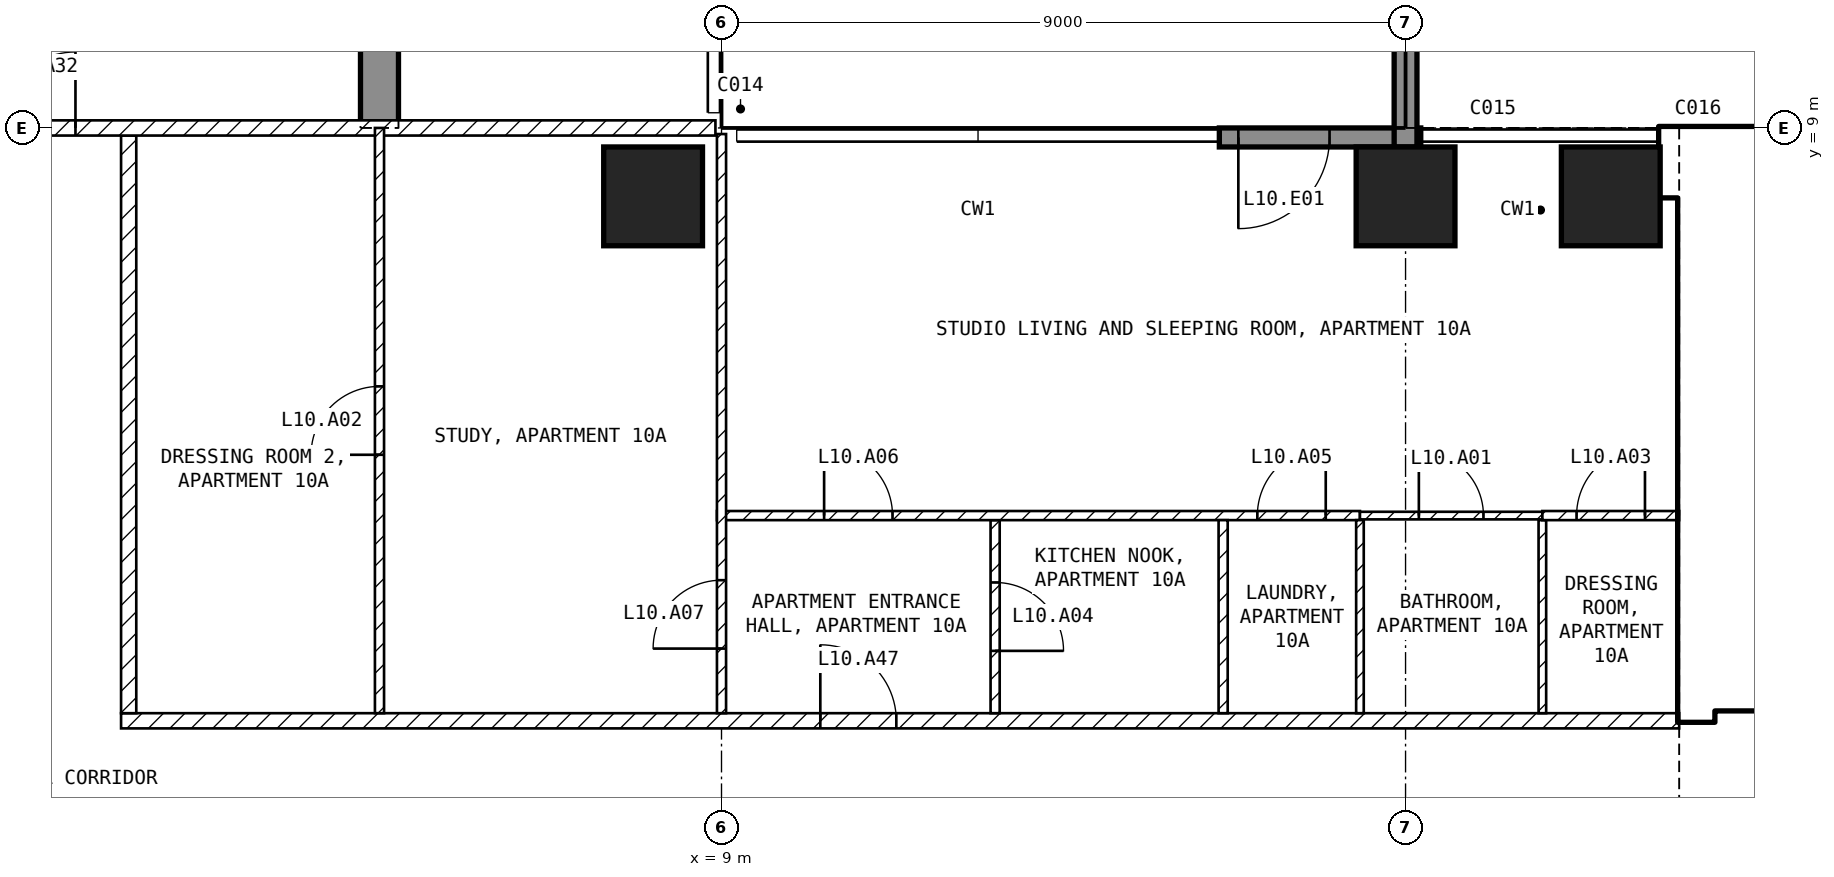
"""IFC4 building model, lengths in metres.
Left out: names, types, materials, properties, quantities, classifications, styles, units other than length and angle.
Written with IfcOpenShell. Run it as: python <this file> out.ifc"""

import sys

from ifc_helpers import new_model, si_unit, direction, frame, frame_2d, origin, origin_2d, place, context, subcontext, project, spatial, polyline, rectangle, outline, extrude, element, fill, save


model = new_model("IFC4")
c1 = context("Model", 3, precision=1e-05, world=origin(), true_north=direction((0.0, 1.0)))
c2 = subcontext(c1, "Body", "Model", "MODEL_VIEW")
j1 = project(units=[si_unit("LENGTHUNIT", "METRE"), si_unit("PLANEANGLEUNIT", "RADIAN")], contexts=[c1])
p1 = place(None, origin())
s1 = spatial("IfcSite", under=j1, at=p1, CompositionType="ELEMENT")
p2 = place(p1, origin())
s2 = spatial("IfcBuilding", under=s1, at=p2, CompositionType="ELEMENT")
p3 = place(p2, frame((0.0, 0.0, 54.0)))
s3 = spatial("IfcBuildingStorey", under=s2, at=p3, CompositionType="ELEMENT", Elevation=54.0)
for number, where, z_axis, x_axis in (
    (1, (8.1, 8.1, -0.25), (0.0, 0.0, 1.0), (1.0, 0.0, 0.0)),
    (2, (18.0, 8.1, -0.25), (0.0, 0.0, 1.0), (1.0, 0.0, 0.0)),
    (3, (20.7, 8.1, -0.25), (0.0, 0.0, 1.0), (1.0, 0.0, 0.0)),
):
    element("IfcColumn", number, at=place(p3, frame(where, z_axis=z_axis, x_axis=x_axis)), inside=s3, PredefinedType="COLUMN", context=c2, shape_type="SweptSolid", body=[
        extrude(rectangle(XDim=1.3, YDim=1.3, at=origin_2d()), origin(), (0.0, 0.0, 1.0), 3.5),
    ])
p4 = place(p3, frame((4.25, 9.0, -0.25), z_axis=(1.0, 0.0, 0.0), x_axis=(0.0, 1.0, 0.0)))
e4 = element("IfcWall", 4, at=p4, inside=s3, PredefinedType="SHEAR", context=c2, shape_type="SweptSolid", body=[
    extrude(outline(polyline([(0.0, 0.0), (2.1, 0.0), (2.1, 2.65), (4.5, 2.65), (4.5, 0.0), (9.9, 0.0), (9.9, 2.65), (12.3, 2.65), (12.3, 0.0), (16.45, 0.0), (16.45, 3.5), (0.0, 3.5), (0.0, 0.0)])), origin(), (0.0, 0.0, 1.0), 0.5),
])
p5 = place(p3, frame((18.2, 8.875, 0.0), z_axis=(0.0, 0.0, 1.0), x_axis=(-1.0, 0.0, 0.0)))
e5 = element("IfcWall", 5, at=p5, inside=s3, PredefinedType="SOLIDWALL", context=c2, shape_type="SweptSolid", body=[
    extrude(rectangle(XDim=2.65, YDim=0.25, at=frame_2d((1.325, 0.0))), origin(), (0.0, 0.0, 1.0), 3.25),
])
p6 = place(p5, frame((1.2, 0.0, 0.0)))
e6 = element("IfcOpeningElement", 6, at=p6, cuts=e5, PredefinedType="OPENING", context=c2, shape_type="SweptSolid", body=[
    extrude(rectangle(XDim=1.2, YDim=2.4, at=frame_2d((0.6, 1.2))), frame((0.0, 0.135, 0.0), z_axis=(0.0, -1.0, 0.0), x_axis=(1.0, 0.0, 0.0)), (0.0, 0.0, 1.0), 0.27),
])
p7 = place(p3, frame((18.0, 8.75, 0.0), z_axis=(0.0, 0.0, 1.0), x_axis=(0.0, 1.0, 0.0)))
e7 = element("IfcWall", 7, at=p7, inside=s3, PredefinedType="SOLIDWALL", context=c2, shape_type="SweptSolid", body=[
    extrude(rectangle(XDim=2.95, YDim=0.3, at=frame_2d((1.475, 0.0))), origin(), (0.0, 0.0, 1.0), 3.25),
])
p8 = place(p3, frame((21.35, 8.55, 0.0), z_axis=(0.0, 0.0, 1.0), x_axis=(1.0, 0.0, 0.0)))
e8 = element("IfcWall", 8, at=p8, inside=s3, PredefinedType="SHEAR", context=c2, shape_type="SweptSolid", body=[
    extrude(rectangle(XDim=10.15, YDim=0.9, at=frame_2d((5.075, 0.0))), origin(), (0.0, 0.0, 1.0), 3.25),
])
p9 = place(p3, frame((21.825, 1.2, 0.0), z_axis=(0.0, 0.0, 1.0), x_axis=(0.0, 1.0, 0.0)))
e9 = element("IfcWall", 9, at=p9, inside=s3, PredefinedType="SHEAR", context=c2, shape_type="SweptSolid", body=[
    extrude(rectangle(XDim=6.9, YDim=0.45, at=frame_2d((3.45, 0.0))), origin(), (0.0, 0.0, 1.0), 3.25),
])
p10 = place(p3, frame((22.05, 1.45, 0.0), z_axis=(0.0, 0.0, 1.0), x_axis=(1.0, 0.0, 0.0)))
e10 = element("IfcWall", 10, at=p10, inside=s3, PredefinedType="SOLIDWALL", context=c2, shape_type="SweptSolid", body=[
    extrude(rectangle(XDim=13.05, YDim=0.2, at=frame_2d((6.525, 0.0))), origin(), (0.0, 0.0, 1.0), 3.25),
])
p11 = place(p10, frame((0.75, 0.0, 0.0)))
e11 = element("IfcOpeningElement", 11, at=p11, cuts=e10, PredefinedType="OPENING", context=c2, shape_type="SweptSolid", body=[
    extrude(rectangle(XDim=1.0, YDim=2.1, at=frame_2d((0.5, 1.05))), frame((0.0, 0.11, 0.0), z_axis=(0.0, -1.0, 0.0), x_axis=(1.0, 0.0, 0.0)), (0.0, 0.0, 1.0), 0.22),
])
p12 = place(p10, frame((3.25, 0.0, 0.0)))
e12 = element("IfcOpeningElement", 12, at=p12, cuts=e10, PredefinedType="OPENING", context=c2, shape_type="SweptSolid", body=[
    extrude(rectangle(XDim=1.0, YDim=2.1, at=frame_2d((0.5, 1.05))), frame((0.0, 0.11, 0.0), z_axis=(0.0, -1.0, 0.0), x_axis=(1.0, 0.0, 0.0)), (0.0, 0.0, 1.0), 0.22),
])
p13 = place(p3, frame((22.05, 5.15, 0.0), z_axis=(0.0, 0.0, 1.0), x_axis=(1.0, 0.0, 0.0)))
e13 = element("IfcWall", 13, at=p13, inside=s3, PredefinedType="SOLIDWALL", context=c2, shape_type="SweptSolid", body=[
    extrude(rectangle(XDim=6.3, YDim=0.2, at=frame_2d((3.15, 0.0))), origin(), (0.0, 0.0, 1.0), 3.25),
])
p14 = place(p13, frame((0.2, 0.0, 0.0)))
e14 = element("IfcOpeningElement", 14, at=p14, cuts=e13, PredefinedType="OPENING", context=c2, shape_type="SweptSolid", body=[
    extrude(rectangle(XDim=1.0, YDim=2.1, at=frame_2d((0.5, 1.05))), frame((0.0, 0.11, 0.0), z_axis=(0.0, -1.0, 0.0), x_axis=(1.0, 0.0, 0.0)), (0.0, 0.0, 1.0), 0.22),
])
p15 = place(p3, frame((1.1, 1.2, 0.0), z_axis=(0.0, 0.0, 1.0), x_axis=(1.0, 0.0, 0.0)))
e15 = element("IfcWall", 15, at=p15, inside=s3, PredefinedType="PARTITIONING", context=c2, shape_type="SweptSolid", body=[
    extrude(rectangle(XDim=20.5, YDim=0.2, at=frame_2d((10.25, 0.0))), origin(), (0.0, 0.0, 1.0), 3.25),
])
p16 = place(p15, frame((9.2, 0.0, 0.0)))
e16 = element("IfcOpeningElement", 16, at=p16, cuts=e15, PredefinedType="OPENING", context=c2, shape_type="SweptSolid", body=[
    extrude(rectangle(XDim=1.0, YDim=2.1, at=frame_2d((0.5, 1.05))), frame((0.0, 0.11, 0.0), z_axis=(0.0, -1.0, 0.0), x_axis=(1.0, 0.0, 0.0)), (0.0, 0.0, 1.0), 0.22),
])
p17 = place(p3, frame((1.2, 8.9, 0.0), z_axis=(0.0, 0.0, 1.0), x_axis=(0.0, -1.0, 0.0)))
e17 = element("IfcWall", 17, at=p17, inside=s3, PredefinedType="PARTITIONING", context=c2, shape_type="SweptSolid", body=[
    extrude(rectangle(XDim=7.6, YDim=0.2, at=frame_2d((3.8, 0.0))), origin(), (0.0, 0.0, 1.0), 3.25),
])
p18 = place(p3, frame((-8.92, 9.0, 0.0), z_axis=(0.0, 0.0, 1.0), x_axis=(1.0, 0.0, 0.0)))
e18 = element("IfcWall", 18, at=p18, inside=s3, PredefinedType="PARTITIONING", context=c2, shape_type="SweptSolid", body=[
    extrude(rectangle(XDim=17.84, YDim=0.2, at=frame_2d((8.92, 0.0))), origin(), (0.0, 0.0, 1.0), 3.25),
])
p19 = place(p18, frame((8.42, 0.0, 0.0)))
e19 = element("IfcOpeningElement", 19, at=p19, cuts=e18, PredefinedType="OPENING", context=c2, shape_type="SweptSolid", body=[
    extrude(rectangle(XDim=1.0, YDim=2.1, at=frame_2d((0.5, 1.05))), frame((0.0, 0.11, 0.0), z_axis=(0.0, -1.0, 0.0), x_axis=(1.0, 0.0, 0.0)), (0.0, 0.0, 1.0), 0.22),
])
p20 = place(p3, frame((12.6, 3.84, 0.0), z_axis=(0.0, 0.0, 1.0), x_axis=(0.0, -1.0, 0.0)))
e20 = element("IfcWall", 20, at=p20, inside=s3, PredefinedType="PARTITIONING", context=c2, shape_type="SweptSolid", body=[
    extrude(rectangle(XDim=2.54, YDim=0.12, at=frame_2d((1.27, 0.0))), origin(), (0.0, 0.0, 1.0), 3.25),
])
p21 = place(p20, frame((0.82, 0.0, 0.0)))
e21 = element("IfcOpeningElement", 21, at=p21, cuts=e20, PredefinedType="OPENING", context=c2, shape_type="SweptSolid", body=[
    extrude(rectangle(XDim=0.9, YDim=2.1, at=frame_2d((0.45, 1.05))), frame((0.0, 0.07, 0.0), z_axis=(0.0, -1.0, 0.0), x_axis=(1.0, 0.0, 0.0)), (0.0, 0.0, 1.0), 0.14),
])
p22 = place(p3, frame((8.94, 3.9, 0.0), z_axis=(0.0, 0.0, 1.0), x_axis=(1.0, 0.0, 0.0)))
e22 = element("IfcWall", 22, at=p22, inside=s3, PredefinedType="PARTITIONING", context=c2, shape_type="SweptSolid", body=[
    extrude(rectangle(XDim=8.46, YDim=0.12, at=frame_2d((4.23, 0.0))), origin(), (0.0, 0.0, 1.0), 3.25),
])
p23 = place(p22, frame((7.11, 0.0, 0.0)))
e23 = element("IfcOpeningElement", 23, at=p23, cuts=e22, PredefinedType="OPENING", context=c2, shape_type="SweptSolid", body=[
    extrude(rectangle(XDim=0.9, YDim=2.1, at=frame_2d((0.45, 1.05))), frame((0.0, 0.07, 0.0), z_axis=(0.0, -1.0, 0.0), x_axis=(1.0, 0.0, 0.0)), (0.0, 0.0, 1.0), 0.14),
])
p24 = place(p22, frame((1.41, 0.0, 0.0)))
e24 = element("IfcOpeningElement", 24, at=p24, cuts=e22, PredefinedType="OPENING", context=c2, shape_type="SweptSolid", body=[
    extrude(rectangle(XDim=0.9, YDim=2.1, at=frame_2d((0.45, 1.05))), frame((0.0, 0.07, 0.0), z_axis=(0.0, -1.0, 0.0), x_axis=(1.0, 0.0, 0.0)), (0.0, 0.0, 1.0), 0.14),
])
p25 = place(p3, frame((9.0, 1.3, 0.0), z_axis=(0.0, 0.0, 1.0), x_axis=(0.0, 1.0, 0.0)))
e25 = element("IfcWall", 25, at=p25, inside=s3, PredefinedType="PARTITIONING", context=c2, shape_type="SweptSolid", body=[
    extrude(rectangle(XDim=7.62, YDim=0.12, at=frame_2d((3.81, 0.0))), origin(), (0.0, 0.0, 1.0), 3.25),
])
p26 = place(p25, frame((0.85, 0.0, 0.0)))
e26 = element("IfcOpeningElement", 26, at=p26, cuts=e25, PredefinedType="OPENING", context=c2, shape_type="SweptSolid", body=[
    extrude(rectangle(XDim=0.9, YDim=2.1, at=frame_2d((0.45, 1.05))), frame((0.0, 0.07, 0.0), z_axis=(0.0, -1.0, 0.0), x_axis=(1.0, 0.0, 0.0)), (0.0, 0.0, 1.0), 0.14),
])
p27 = place(p3, frame((15.6, 3.84, 0.0), z_axis=(0.0, 0.0, 1.0), x_axis=(0.0, -1.0, 0.0)))
e27 = element("IfcWall", 27, at=p27, inside=s3, PredefinedType="PARTITIONING", context=c2, shape_type="SweptSolid", body=[
    extrude(rectangle(XDim=2.54, YDim=0.12, at=frame_2d((1.27, 0.0))), origin(), (0.0, 0.0, 1.0), 3.25),
])
for number, where, z_axis, x_axis in (
    (28, (17.4, 3.84, 0.0), (0.0, 0.0, 1.0), (0.0, -1.0, 0.0)),
    (29, (19.8, 3.84, 0.0), (0.0, 0.0, 1.0), (0.0, -1.0, 0.0)),
):
    element("IfcWall", number, at=place(p3, frame(where, z_axis=z_axis, x_axis=x_axis)), inside=s3, PredefinedType="PARTITIONING", context=c2, shape_type="SweptSolid", body=[
        extrude(rectangle(XDim=2.54, YDim=0.1, at=frame_2d((1.27, 0.0))), origin(), (0.0, 0.0, 1.0), 3.25),
    ])
p28 = place(p3, frame((17.4, 3.9, 0.0), z_axis=(0.0, 0.0, 1.0), x_axis=(1.0, 0.0, 0.0)))
e30 = element("IfcWall", 30, at=p28, inside=s3, PredefinedType="PARTITIONING", context=c2, shape_type="SweptSolid", body=[
    extrude(rectangle(XDim=2.4, YDim=0.1, at=frame_2d((1.2, 0.0))), origin(), (0.0, 0.0, 1.0), 3.25),
])
p29 = place(p28, frame((0.775, 0.0, 0.0)))
e31 = element("IfcOpeningElement", 31, at=p29, cuts=e30, PredefinedType="OPENING", context=c2, shape_type="SweptSolid", body=[
    extrude(rectangle(XDim=0.85, YDim=2.1, at=frame_2d((0.425, 1.05))), frame((0.0, 0.06, 0.0), z_axis=(0.0, -1.0, 0.0), x_axis=(1.0, 0.0, 0.0)), (0.0, 0.0, 1.0), 0.12),
])
p30 = place(p3, frame((19.8, 3.9, 0.0), z_axis=(0.0, 0.0, 1.0), x_axis=(1.0, 0.0, 0.0)))
e32 = element("IfcWall", 32, at=p30, inside=s3, PredefinedType="PARTITIONING", context=c2, shape_type="SweptSolid", body=[
    extrude(rectangle(XDim=1.8, YDim=0.12, at=frame_2d((0.9, 0.0))), origin(), (0.0, 0.0, 1.0), 3.25),
])
p31 = place(p30, frame((0.45, 0.0, 0.0)))
e33 = element("IfcOpeningElement", 33, at=p31, cuts=e32, PredefinedType="OPENING", context=c2, shape_type="SweptSolid", body=[
    extrude(rectangle(XDim=0.9, YDim=2.1, at=frame_2d((0.45, 1.05))), frame((0.0, 0.07, 0.0), z_axis=(0.0, -1.0, 0.0), x_axis=(1.0, 0.0, 0.0)), (0.0, 0.0, 1.0), 0.14),
])
p32 = place(p3, frame((4.5, 1.3, 0.0), z_axis=(0.0, 0.0, 1.0), x_axis=(0.0, 1.0, 0.0)))
e34 = element("IfcWall", 34, at=p32, inside=s3, PredefinedType="PARTITIONING", context=c2, shape_type="SweptSolid", body=[
    extrude(rectangle(XDim=7.7, YDim=0.12, at=frame_2d((3.85, 0.0))), origin(), (0.0, 0.0, 1.0), 3.25),
])
p33 = place(p32, frame((3.4, 0.0, 0.0)))
e35 = element("IfcOpeningElement", 35, at=p33, cuts=e34, PredefinedType="OPENING", context=c2, shape_type="SweptSolid", body=[
    extrude(rectangle(XDim=0.9, YDim=2.1, at=frame_2d((0.45, 1.05))), frame((0.0, 0.07, 0.0), z_axis=(0.0, -1.0, 0.0), x_axis=(1.0, 0.0, 0.0)), (0.0, 0.0, 1.0), 0.14),
])
p34 = place(p6, origin())
e36 = element("IfcDoor", 36, at=p34, inside=s3, OperationType="SINGLE_SWING_RIGHT", PredefinedType="DOOR", context=c2, shape_type="SweptSolid", body=[
    extrude(rectangle(XDim=1.2, YDim=2.4, at=frame_2d((0.6, 1.2))), frame((0.0, 0.025, 0.0), z_axis=(0.0, -1.0, 0.0), x_axis=(1.0, 0.0, 0.0)), (0.0, 0.0, 1.0), 0.05),
])
fill(e6, e36)
p35 = place(p14, origin())
e37 = element("IfcDoor", 37, at=p35, inside=s3, OperationType="SINGLE_SWING_LEFT", PredefinedType="DOOR", context=c2, shape_type="SweptSolid", body=[
    extrude(rectangle(XDim=1.0, YDim=2.1, at=frame_2d((0.5, 1.05))), frame((0.0, 0.025, 0.0), z_axis=(0.0, -1.0, 0.0), x_axis=(1.0, 0.0, 0.0)), (0.0, 0.0, 1.0), 0.05),
])
fill(e14, e37)
p36 = place(p29, origin())
e38 = element("IfcDoor", 38, at=p36, inside=s3, OperationType="SINGLE_SWING_LEFT", PredefinedType="DOOR", context=c2, shape_type="SweptSolid", body=[
    extrude(rectangle(XDim=0.85, YDim=2.1, at=frame_2d((0.425, 1.05))), frame((0.0, 0.025, 0.0), z_axis=(0.0, -1.0, 0.0), x_axis=(1.0, 0.0, 0.0)), (0.0, 0.0, 1.0), 0.05),
])
fill(e31, e38)
p37 = place(p33, origin())
e39 = element("IfcDoor", 39, at=p37, inside=s3, OperationType="SINGLE_SWING_LEFT", PredefinedType="DOOR", context=c2, shape_type="SweptSolid", body=[
    extrude(rectangle(XDim=0.9, YDim=2.1, at=frame_2d((0.45, 1.05))), frame((0.0, 0.025, 0.0), z_axis=(0.0, -1.0, 0.0), x_axis=(1.0, 0.0, 0.0)), (0.0, 0.0, 1.0), 0.05),
])
fill(e35, e39)
p38 = place(p31, origin())
e40 = element("IfcDoor", 40, at=p38, inside=s3, OperationType="SINGLE_SWING_RIGHT", PredefinedType="DOOR", context=c2, shape_type="SweptSolid", body=[
    extrude(rectangle(XDim=0.9, YDim=2.1, at=frame_2d((0.45, 1.05))), frame((0.0, 0.025, 0.0), z_axis=(0.0, -1.0, 0.0), x_axis=(1.0, 0.0, 0.0)), (0.0, 0.0, 1.0), 0.05),
])
fill(e33, e40)
p39 = place(p21, origin())
e41 = element("IfcDoor", 41, at=p39, inside=s3, OperationType="SINGLE_SWING_RIGHT", PredefinedType="DOOR", context=c2, shape_type="SweptSolid", body=[
    extrude(rectangle(XDim=0.9, YDim=2.1, at=frame_2d((0.45, 1.05))), frame((0.0, 0.025, 0.0), z_axis=(0.0, -1.0, 0.0), x_axis=(1.0, 0.0, 0.0)), (0.0, 0.0, 1.0), 0.05),
])
fill(e21, e41)
p40 = place(p23, origin())
e42 = element("IfcDoor", 42, at=p40, inside=s3, OperationType="SINGLE_SWING_RIGHT", PredefinedType="DOOR", context=c2, shape_type="SweptSolid", body=[
    extrude(rectangle(XDim=0.9, YDim=2.1, at=frame_2d((0.45, 1.05))), frame((0.0, 0.025, 0.0), z_axis=(0.0, -1.0, 0.0), x_axis=(1.0, 0.0, 0.0)), (0.0, 0.0, 1.0), 0.05),
])
fill(e23, e42)
p41 = place(p24, origin())
e43 = element("IfcDoor", 43, at=p41, inside=s3, OperationType="SINGLE_SWING_LEFT", PredefinedType="DOOR", context=c2, shape_type="SweptSolid", body=[
    extrude(rectangle(XDim=0.9, YDim=2.1, at=frame_2d((0.45, 1.05))), frame((0.0, 0.025, 0.0), z_axis=(0.0, -1.0, 0.0), x_axis=(1.0, 0.0, 0.0)), (0.0, 0.0, 1.0), 0.05),
])
fill(e24, e43)
p42 = place(p26, origin())
e44 = element("IfcDoor", 44, at=p42, inside=s3, OperationType="SINGLE_SWING_LEFT", PredefinedType="DOOR", context=c2, shape_type="SweptSolid", body=[
    extrude(rectangle(XDim=0.9, YDim=2.1, at=frame_2d((0.45, 1.05))), frame((0.0, 0.025, 0.0), z_axis=(0.0, -1.0, 0.0), x_axis=(1.0, 0.0, 0.0)), (0.0, 0.0, 1.0), 0.05),
])
fill(e26, e44)
p43 = place(p19, origin())
e45 = element("IfcDoor", 45, at=p43, inside=s3, OperationType="SINGLE_SWING_RIGHT", PredefinedType="DOOR", context=c2, shape_type="SweptSolid", body=[
    extrude(rectangle(XDim=1.0, YDim=2.1, at=frame_2d((0.5, 1.05))), frame((0.0, 0.025, 0.0), z_axis=(0.0, -1.0, 0.0), x_axis=(1.0, 0.0, 0.0)), (0.0, 0.0, 1.0), 0.05),
])
fill(e19, e45)
p44 = place(p16, origin())
e46 = element("IfcDoor", 46, at=p44, inside=s3, OperationType="SINGLE_SWING_LEFT", PredefinedType="DOOR", context=c2, shape_type="SweptSolid", body=[
    extrude(rectangle(XDim=1.0, YDim=2.1, at=frame_2d((0.5, 1.05))), frame((0.0, 0.025, 0.0), z_axis=(0.0, -1.0, 0.0), x_axis=(1.0, 0.0, 0.0)), (0.0, 0.0, 1.0), 0.05),
])
fill(e16, e46)
save(model, sys.argv[1])
